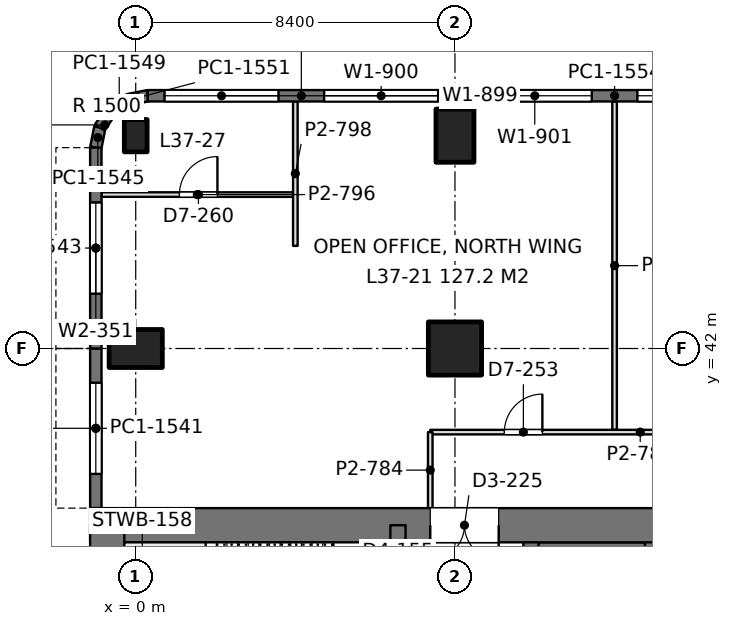
"""IFC4 building model, lengths in metres.
Left out: names, types, materials, properties, quantities, classifications, styles, units other than length and angle.
Written with IfcOpenShell. Run it as: python <this file> out.ifc"""

import sys

from ifc_helpers import new_model, si_unit, direction, frame, frame_2d, origin, origin_2d, place, context, subcontext, project, spatial, rectangle, extrude, element, fill, save


model = new_model("IFC4")
c1 = context("Model", 3, precision=1e-05, world=origin(), true_north=direction((0.0, 1.0)))
c2 = subcontext(c1, "Body", "Model", "MODEL_VIEW")
j1 = project(units=[si_unit("LENGTHUNIT", "METRE"), si_unit("PLANEANGLEUNIT", "RADIAN")], contexts=[c1])
p1 = place(None, origin())
s1 = spatial("IfcSite", under=j1, at=p1, CompositionType="ELEMENT")
p2 = place(p1, origin())
s2 = spatial("IfcBuilding", under=s1, at=p2, CompositionType="ELEMENT")
p3 = place(p2, frame((0.0, 0.0, 163.8)))
s3 = spatial("IfcBuildingStorey", under=s2, at=p3, CompositionType="ELEMENT", Elevation=163.8)
p4 = place(p3, frame((0.0, 42.0, 0.0), z_axis=(0.0, 0.0, 1.0), x_axis=(0.0, 1.0, 0.0)))
e1 = element("IfcColumn", 1, at=p4, inside=s3, PredefinedType="COLUMN", context=c2, shape_type="SweptSolid", body=[
    extrude(rectangle(XDim=1.0, YDim=1.4, at=origin_2d()), origin(), (0.0, 0.0, 1.0), 4.2),
])
p5 = place(p3, frame((0.0, 47.6, 0.0), z_axis=(0.0, 0.0, 1.0), x_axis=(1.0, 0.0, 0.0)))
e2 = element("IfcColumn", 2, at=p5, inside=s3, PredefinedType="COLUMN", context=c2, shape_type="SweptSolid", body=[
    extrude(rectangle(XDim=0.6, YDim=0.85, at=origin_2d()), origin(), (0.0, 0.0, 1.0), 4.2),
])
p6 = place(p3, frame((8.4, 42.0, 0.0), z_axis=(0.0, 0.0, 1.0), x_axis=(1.0, 0.0, 0.0)))
e3 = element("IfcColumn", 3, at=p6, inside=s3, PredefinedType="COLUMN", context=c2, shape_type="SweptSolid", body=[
    extrude(rectangle(XDim=1.4, YDim=1.4, at=origin_2d()), origin(), (0.0, 0.0, 1.0), 4.2),
])
p7 = place(p3, frame((8.4, 47.6, 0.0), z_axis=(0.0, 0.0, 1.0), x_axis=(1.0, 0.0, 0.0)))
e4 = element("IfcColumn", 4, at=p7, inside=s3, PredefinedType="COLUMN", context=c2, shape_type="SweptSolid", body=[
    extrude(rectangle(XDim=1.0, YDim=1.4, at=origin_2d()), origin(), (0.0, 0.0, 1.0), 4.2),
])
p8 = place(p3, frame((-1.2, 37.35, 0.0), z_axis=(0.0, 0.0, 1.0), x_axis=(1.0, 0.0, 0.0)))
e5 = element("IfcWall", 5, at=p8, inside=s3, PredefinedType="SHEAR", context=c2, shape_type="SweptSolid", body=[
    extrude(rectangle(XDim=18.0, YDim=0.9, at=frame_2d((9.0, 0.0))), origin(), (0.0, 0.0, 1.0), 4.2),
])
p9 = place(p8, frame((8.95, 0.0, 0.0)))
e6 = element("IfcOpeningElement", 6, at=p9, cuts=e5, PredefinedType="OPENING", context=c2, shape_type="SweptSolid", body=[
    extrude(rectangle(XDim=1.8, YDim=2.4, at=frame_2d((0.9, 1.2))), frame((0.0, 0.46, 0.0), z_axis=(0.0, -1.0, 0.0), x_axis=(1.0, 0.0, 0.0)), (0.0, 0.0, 1.0), 0.92),
])
p10 = place(p3, frame((-0.75, 13.05, 0.0), z_axis=(0.0, 0.0, 1.0), x_axis=(0.0, 1.0, 0.0)))
e7 = element("IfcWall", 7, at=p10, inside=s3, PredefinedType="SHEAR", context=c2, shape_type="SweptSolid", body=[
    extrude(rectangle(XDim=24.3, YDim=0.9, at=frame_2d((12.15, 0.0))), origin(), (0.0, 0.0, 1.0), 4.2),
])
p11 = place(p3, frame((6.9, 13.05, 0.0), z_axis=(0.0, 0.0, 1.0), x_axis=(0.0, 1.0, 0.0)))
e8 = element("IfcWall", 8, at=p11, inside=s3, PredefinedType="SHEAR", context=c2, shape_type="SweptSolid", body=[
    extrude(rectangle(XDim=24.3, YDim=0.4, at=frame_2d((12.15, 0.0))), origin(), (0.0, 0.0, 1.0), 4.2),
])
p12 = place(p11, frame((1.3, 0.0, 0.0)))
e9 = element("IfcOpeningElement", 9, at=p12, cuts=e8, PredefinedType="OPENING", context=c2, shape_type="SweptSolid", body=[
    extrude(rectangle(XDim=1.0, YDim=2.2, at=frame_2d((0.5, 1.1))), frame((0.0, 0.21, 0.0), z_axis=(0.0, -1.0, 0.0), x_axis=(1.0, 0.0, 0.0)), (0.0, 0.0, 1.0), 0.42),
])
p13 = place(p11, frame((22.0, 0.0, 0.0)))
e10 = element("IfcOpeningElement", 10, at=p13, cuts=e8, PredefinedType="OPENING", context=c2, shape_type="SweptSolid", body=[
    extrude(rectangle(XDim=1.0, YDim=2.2, at=frame_2d((0.5, 1.1))), frame((0.0, 0.21, 0.0), z_axis=(0.0, -1.0, 0.0), x_axis=(1.0, 0.0, 0.0)), (0.0, 0.0, 1.0), 0.42),
])
p14 = place(p11, frame((5.55, 0.0, 0.0)))
e11 = element("IfcOpeningElement", 11, at=p14, cuts=e8, PredefinedType="OPENING", context=c2, shape_type="SweptSolid", body=[
    extrude(rectangle(XDim=1.0, YDim=2.2, at=frame_2d((0.5, 1.1))), frame((0.0, 0.21, 0.0), z_axis=(0.0, -1.0, 0.0), x_axis=(1.0, 0.0, 0.0)), (0.0, 0.0, 1.0), 0.42),
])
p15 = place(p11, frame((9.55, 0.0, 0.0)))
e12 = element("IfcOpeningElement", 12, at=p15, cuts=e8, PredefinedType="OPENING", context=c2, shape_type="SweptSolid", body=[
    extrude(rectangle(XDim=1.0, YDim=2.2, at=frame_2d((0.5, 1.1))), frame((0.0, 0.21, 0.0), z_axis=(0.0, -1.0, 0.0), x_axis=(1.0, 0.0, 0.0)), (0.0, 0.0, 1.0), 0.42),
])
p16 = place(p11, frame((12.8, 0.0, 0.0)))
e13 = element("IfcOpeningElement", 13, at=p16, cuts=e8, PredefinedType="OPENING", context=c2, shape_type="SweptSolid", body=[
    extrude(rectangle(XDim=1.1, YDim=2.2, at=frame_2d((0.55, 1.1))), frame((0.0, 0.21, 0.0), z_axis=(0.0, -1.0, 0.0), x_axis=(1.0, 0.0, 0.0)), (0.0, 0.0, 1.0), 0.42),
])
p17 = place(p11, frame((15.538, 0.0, 0.0)))
e14 = element("IfcOpeningElement", 14, at=p17, cuts=e8, PredefinedType="OPENING", context=c2, shape_type="SweptSolid", body=[
    extrude(rectangle(XDim=1.1, YDim=2.2, at=frame_2d((0.55, 1.1))), frame((0.0, 0.21, 0.0), z_axis=(0.0, -1.0, 0.0), x_axis=(1.0, 0.0, 0.0)), (0.0, 0.0, 1.0), 0.42),
])
p18 = place(p11, frame((18.262, 0.0, 0.0)))
e15 = element("IfcOpeningElement", 15, at=p18, cuts=e8, PredefinedType="OPENING", context=c2, shape_type="SweptSolid", body=[
    extrude(rectangle(XDim=1.1, YDim=2.2, at=frame_2d((0.55, 1.1))), frame((0.0, 0.21, 0.0), z_axis=(0.0, -1.0, 0.0), x_axis=(1.0, 0.0, 0.0)), (0.0, 0.0, 1.0), 0.42),
])
p19 = place(p3, frame((10.4, 13.05, 0.0), z_axis=(0.0, 0.0, 1.0), x_axis=(0.0, 1.0, 0.0)))
e16 = element("IfcWall", 16, at=p19, inside=s3, PredefinedType="SHEAR", context=c2, shape_type="SweptSolid", body=[
    extrude(rectangle(XDim=24.3, YDim=0.4, at=frame_2d((12.15, 0.0))), origin(), (0.0, 0.0, 1.0), 4.2),
])
p20 = place(p19, frame((10.05, 0.0, 0.0)))
e17 = element("IfcOpeningElement", 17, at=p20, cuts=e16, PredefinedType="OPENING", context=c2, shape_type="SweptSolid", body=[
    extrude(rectangle(XDim=1.1, YDim=2.2, at=frame_2d((0.55, 1.1))), frame((0.0, 0.21, 0.0), z_axis=(0.0, -1.0, 0.0), x_axis=(1.0, 0.0, 0.0)), (0.0, 0.0, 1.0), 0.42),
])
p21 = place(p19, frame((12.9, 0.0, 0.0)))
e18 = element("IfcOpeningElement", 18, at=p21, cuts=e16, PredefinedType="OPENING", context=c2, shape_type="SweptSolid", body=[
    extrude(rectangle(XDim=1.1, YDim=2.2, at=frame_2d((0.55, 1.1))), frame((0.0, 0.21, 0.0), z_axis=(0.0, -1.0, 0.0), x_axis=(1.0, 0.0, 0.0)), (0.0, 0.0, 1.0), 0.42),
])
p22 = place(p19, frame((21.45, 0.0, 0.0)))
e19 = element("IfcOpeningElement", 19, at=p22, cuts=e16, PredefinedType="OPENING", context=c2, shape_type="SweptSolid", body=[
    extrude(rectangle(XDim=1.1, YDim=2.2, at=frame_2d((0.55, 1.1))), frame((0.0, 0.21, 0.0), z_axis=(0.0, -1.0, 0.0), x_axis=(1.0, 0.0, 0.0)), (0.0, 0.0, 1.0), 0.42),
])
p23 = place(p19, frame((2.05, 0.0, 0.0)))
e20 = element("IfcOpeningElement", 20, at=p23, cuts=e16, PredefinedType="OPENING", context=c2, shape_type="SweptSolid", body=[
    extrude(rectangle(XDim=1.8, YDim=2.4, at=frame_2d((0.9, 1.2))), frame((0.0, 0.21, 0.0), z_axis=(0.0, -1.0, 0.0), x_axis=(1.0, 0.0, 0.0)), (0.0, 0.0, 1.0), 0.42),
])
p24 = place(p19, frame((5.8, 0.0, 0.0)))
e21 = element("IfcOpeningElement", 21, at=p24, cuts=e16, PredefinedType="OPENING", context=c2, shape_type="SweptSolid", body=[
    extrude(rectangle(XDim=1.8, YDim=2.4, at=frame_2d((0.9, 1.2))), frame((0.0, 0.21, 0.0), z_axis=(0.0, -1.0, 0.0), x_axis=(1.0, 0.0, 0.0)), (0.0, 0.0, 1.0), 0.42),
])
p25 = place(p3, frame((13.6, 22.225, 0.0), z_axis=(0.0, 0.0, 1.0), x_axis=(0.0, 1.0, 0.0)))
e22 = element("IfcWall", 22, at=p25, inside=s3, PredefinedType="SHEAR", context=c2, shape_type="SweptSolid", body=[
    extrude(rectangle(XDim=15.125, YDim=0.4, at=frame_2d((7.562, 0.0))), origin(), (0.0, 0.0, 1.0), 4.2),
])
p26 = place(p3, frame((10.4, 36.625, 0.0), z_axis=(0.0, 0.0, 1.0), x_axis=(1.0, 0.0, 0.0)))
e23 = element("IfcWall", 23, at=p26, inside=s3, PredefinedType="SHEAR", context=c2, shape_type="SweptSolid", body=[
    extrude(rectangle(XDim=3.2, YDim=0.55, at=frame_2d((1.6, 0.0))), origin(), (0.0, 0.0, 1.0), 4.2),
])
p27 = place(p3, frame((-1.05, 37.8, 0.0), z_axis=(0.0, 0.0, 1.0), x_axis=(0.0, 1.0, 0.0)))
e24 = element("IfcWall", 24, at=p27, inside=s3, PredefinedType="SOLIDWALL", context=c2, shape_type="SweptSolid", body=[
    extrude(rectangle(XDim=4.2, YDim=0.3, at=frame_2d((2.1, 0.0))), origin(), (0.0, 0.0, 1.0), 4.0),
])
p28 = place(p27, frame((0.9, 0.0, 0.9)))
e25 = element("IfcOpeningElement", 25, at=p28, cuts=e24, PredefinedType="OPENING", context=c2, shape_type="SweptSolid", body=[
    extrude(rectangle(XDim=2.4, YDim=1.9, at=frame_2d((1.2, 0.95))), frame((0.0, 0.16, 0.0), z_axis=(0.0, -1.0, 0.0), x_axis=(1.0, 0.0, 0.0)), (0.0, 0.0, 1.0), 0.32),
])
p29 = place(p3, frame((-1.05, 42.0, 0.0), z_axis=(0.0, 0.0, 1.0), x_axis=(0.0, 1.0, 0.0)))
e26 = element("IfcWall", 26, at=p29, inside=s3, PredefinedType="SOLIDWALL", context=c2, shape_type="SweptSolid", body=[
    extrude(rectangle(XDim=5.285, YDim=0.3, at=frame_2d((2.643, 0.0))), origin(), (0.0, 0.0, 1.0), 4.0),
])
p30 = place(p29, frame((1.443, 0.0, 0.9)))
e27 = element("IfcOpeningElement", 27, at=p30, cuts=e26, PredefinedType="OPENING", context=c2, shape_type="SweptSolid", body=[
    extrude(rectangle(XDim=2.4, YDim=1.9, at=frame_2d((1.2, 0.95))), frame((0.0, 0.16, 0.0), z_axis=(0.0, -1.0, 0.0), x_axis=(1.0, 0.0, 0.0)), (0.0, 0.0, 1.0), 0.32),
])
p31 = place(p3, frame((-1.05, 47.285, 0.0), z_axis=(0.0, 0.0, 1.0), x_axis=(0.195073962632, 0.980788534345, 0.0)))
e28 = element("IfcWall", 28, at=p31, inside=s3, PredefinedType="SOLIDWALL", context=c2, shape_type="SweptSolid", body=[
    extrude(rectangle(XDim=0.541, YDim=0.3, at=frame_2d((0.271, 0.0))), origin(), (0.0, 0.0, 1.0), 4.0),
])
p32 = place(p3, frame((-0.945, 47.815, 0.0), z_axis=(0.0, 0.0, 1.0), x_axis=(0.55534295404, 0.831621430339, 0.0)))
e29 = element("IfcWall", 29, at=p32, inside=s3, PredefinedType="SOLIDWALL", context=c2, shape_type="SweptSolid", body=[
    extrude(rectangle(XDim=0.526, YDim=0.3, at=frame_2d((0.263, 0.0))), origin(), (0.0, 0.0, 1.0), 4.0),
])
p33 = place(p3, frame((-0.653, 48.253, 0.0), z_axis=(0.0, 0.0, 1.0), x_axis=(0.831692711774, 0.555236195849, 0.0)))
e30 = element("IfcWall", 30, at=p33, inside=s3, PredefinedType="SOLIDWALL", context=c2, shape_type="SweptSolid", body=[
    extrude(rectangle(XDim=0.525, YDim=0.3, at=frame_2d((0.263, 0.0))), origin(), (0.0, 0.0, 1.0), 4.0),
])
p34 = place(p3, frame((-0.216, 48.544, 0.0), z_axis=(0.0, 0.0, 1.0), x_axis=(0.980788534345, 0.195073962632, 0.0)))
e31 = element("IfcWall", 31, at=p34, inside=s3, PredefinedType="SOLIDWALL", context=c2, shape_type="SweptSolid", body=[
    extrude(rectangle(XDim=0.541, YDim=0.3, at=frame_2d((0.271, 0.0))), origin(), (0.0, 0.0, 1.0), 4.0),
])
p35 = place(p3, frame((0.315, 48.65, 0.0), z_axis=(0.0, 0.0, 1.0), x_axis=(1.0, 0.0, 0.0)))
e32 = element("IfcWall", 32, at=p35, inside=s3, PredefinedType="SOLIDWALL", context=c2, shape_type="SweptSolid", body=[
    extrude(rectangle(XDim=8.085, YDim=0.3, at=frame_2d((4.042, 0.0))), origin(), (0.0, 0.0, 1.0), 4.0),
])
p36 = place(p35, frame((0.443, 0.0, 0.9)))
e33 = element("IfcOpeningElement", 33, at=p36, cuts=e32, PredefinedType="OPENING", context=c2, shape_type="SweptSolid", body=[
    extrude(rectangle(XDim=3.0, YDim=1.9, at=frame_2d((1.5, 0.95))), frame((0.0, 0.16, 0.0), z_axis=(0.0, -1.0, 0.0), x_axis=(1.0, 0.0, 0.0)), (0.0, 0.0, 1.0), 0.32),
])
p37 = place(p35, frame((4.643, 0.0, 0.9)))
e34 = element("IfcOpeningElement", 34, at=p37, cuts=e32, PredefinedType="OPENING", context=c2, shape_type="SweptSolid", body=[
    extrude(rectangle(XDim=3.0, YDim=1.9, at=frame_2d((1.5, 0.95))), frame((0.0, 0.16, 0.0), z_axis=(0.0, -1.0, 0.0), x_axis=(1.0, 0.0, 0.0)), (0.0, 0.0, 1.0), 0.32),
])
p38 = place(p3, frame((8.4, 48.65, 0.0), z_axis=(0.0, 0.0, 1.0), x_axis=(1.0, 0.0, 0.0)))
e35 = element("IfcWall", 35, at=p38, inside=s3, PredefinedType="SOLIDWALL", context=c2, shape_type="SweptSolid", body=[
    extrude(rectangle(XDim=8.4, YDim=0.3, at=frame_2d((4.2, 0.0))), origin(), (0.0, 0.0, 1.0), 4.0),
])
p39 = place(p38, frame((0.6, 0.0, 0.9)))
e36 = element("IfcOpeningElement", 36, at=p39, cuts=e35, PredefinedType="OPENING", context=c2, shape_type="SweptSolid", body=[
    extrude(rectangle(XDim=3.0, YDim=1.9, at=frame_2d((1.5, 0.95))), frame((0.0, 0.16, 0.0), z_axis=(0.0, -1.0, 0.0), x_axis=(1.0, 0.0, 0.0)), (0.0, 0.0, 1.0), 0.32),
])
p40 = place(p38, frame((4.8, 0.0, 0.9)))
e37 = element("IfcOpeningElement", 37, at=p40, cuts=e35, PredefinedType="OPENING", context=c2, shape_type="SweptSolid", body=[
    extrude(rectangle(XDim=3.0, YDim=1.9, at=frame_2d((1.5, 0.95))), frame((0.0, 0.16, 0.0), z_axis=(0.0, -1.0, 0.0), x_axis=(1.0, 0.0, 0.0)), (0.0, 0.0, 1.0), 0.32),
])
p41 = place(p3, frame((-0.902, 46.05, 0.0), z_axis=(0.0, 0.0, 1.0), x_axis=(1.0, 0.0, 0.0)))
e38 = element("IfcWall", 38, at=p41, inside=s3, PredefinedType="PARTITIONING", context=c2, shape_type="SweptSolid", body=[
    extrude(rectangle(XDim=5.044, YDim=0.12, at=frame_2d((2.522, 0.0))), origin(), (0.0, 0.0, 1.0), 3.4),
])
p42 = place(p41, frame((2.052, 0.0, 0.0)))
e39 = element("IfcOpeningElement", 39, at=p42, cuts=e38, PredefinedType="OPENING", context=c2, shape_type="SweptSolid", body=[
    extrude(rectangle(XDim=1.0, YDim=2.4, at=frame_2d((0.5, 1.2))), frame((0.0, 0.07, 0.0), z_axis=(0.0, -1.0, 0.0), x_axis=(1.0, 0.0, 0.0)), (0.0, 0.0, 1.0), 0.14),
])
p43 = place(p3, frame((4.2, 44.7, 0.0), z_axis=(0.0, 0.0, 1.0), x_axis=(0.0, 1.0, 0.0)))
e40 = element("IfcWall", 40, at=p43, inside=s3, PredefinedType="PARTITIONING", context=c2, shape_type="SweptSolid", body=[
    extrude(rectangle(XDim=3.802, YDim=0.12, at=frame_2d((1.901, 0.0))), origin(), (0.0, 0.0, 1.0), 3.593),
])
p44 = place(p3, frame((12.6, 39.858, 0.0), z_axis=(0.0, 0.0, 1.0), x_axis=(0.0, 1.0, 0.0)))
e41 = element("IfcWall", 41, at=p44, inside=s3, PredefinedType="PARTITIONING", context=c2, shape_type="SweptSolid", body=[
    extrude(rectangle(XDim=8.644, YDim=0.12, at=frame_2d((4.322, 0.0))), origin(), (0.0, 0.0, 1.0), 3.3),
])
p45 = place(p3, frame((7.75, 39.8, 0.0), z_axis=(0.0, 0.0, 1.0), x_axis=(1.0, 0.0, 0.0)))
e42 = element("IfcWall", 42, at=p45, inside=s3, PredefinedType="PARTITIONING", context=c2, shape_type="SweptSolid", body=[
    extrude(rectangle(XDim=11.05, YDim=0.12, at=frame_2d((5.525, 0.0))), origin(), (0.0, 0.0, 1.0), 3.4),
])
p46 = place(p45, frame((1.95, 0.0, 0.0)))
e43 = element("IfcOpeningElement", 43, at=p46, cuts=e42, PredefinedType="OPENING", context=c2, shape_type="SweptSolid", body=[
    extrude(rectangle(XDim=1.0, YDim=2.4, at=frame_2d((0.5, 1.2))), frame((0.0, 0.07, 0.0), z_axis=(0.0, -1.0, 0.0), x_axis=(1.0, 0.0, 0.0)), (0.0, 0.0, 1.0), 0.14),
])
p47 = place(p45, frame((6.95, 0.0, 0.0)))
e44 = element("IfcOpeningElement", 44, at=p47, cuts=e42, PredefinedType="OPENING", context=c2, shape_type="SweptSolid", body=[
    extrude(rectangle(XDim=1.8, YDim=2.2, at=frame_2d((0.9, 1.1))), frame((0.0, 0.07, 0.0), z_axis=(0.0, -1.0, 0.0), x_axis=(1.0, 0.0, 0.0)), (0.0, 0.0, 1.0), 0.14),
])
p48 = place(p3, frame((7.75, 37.8, 0.0), z_axis=(0.0, 0.0, 1.0), x_axis=(0.0, 1.0, 0.0)))
e45 = element("IfcWall", 45, at=p48, inside=s3, PredefinedType="PARTITIONING", context=c2, shape_type="SweptSolid", body=[
    extrude(rectangle(XDim=2.0, YDim=0.12, at=frame_2d((1.0, 0.0))), origin(), (0.0, 0.0, 1.0), 4.0),
])
p49 = place(p28, origin())
e46 = element("IfcWindow", 46, at=p49, inside=s3, PartitioningType="SINGLE_PANEL", PredefinedType="WINDOW", context=c2, shape_type="SweptSolid", body=[
    extrude(rectangle(XDim=2.4, YDim=1.9, at=frame_2d((1.2, 0.95))), frame((0.0, 0.03, 0.0), z_axis=(0.0, -1.0, 0.0), x_axis=(1.0, 0.0, 0.0)), (0.0, 0.0, 1.0), 0.06),
])
fill(e25, e46)
p50 = place(p30, origin())
e47 = element("IfcWindow", 47, at=p50, inside=s3, PartitioningType="SINGLE_PANEL", PredefinedType="WINDOW", context=c2, shape_type="SweptSolid", body=[
    extrude(rectangle(XDim=2.4, YDim=1.9, at=frame_2d((1.2, 0.95))), frame((0.0, 0.03, 0.0), z_axis=(0.0, -1.0, 0.0), x_axis=(1.0, 0.0, 0.0)), (0.0, 0.0, 1.0), 0.06),
])
fill(e27, e47)
p51 = place(p36, origin())
e48 = element("IfcWindow", 48, at=p51, inside=s3, PartitioningType="SINGLE_PANEL", PredefinedType="WINDOW", context=c2, shape_type="SweptSolid", body=[
    extrude(rectangle(XDim=3.0, YDim=1.9, at=frame_2d((1.5, 0.95))), frame((0.0, 0.03, 0.0), z_axis=(0.0, -1.0, 0.0), x_axis=(1.0, 0.0, 0.0)), (0.0, 0.0, 1.0), 0.06),
])
fill(e33, e48)
p52 = place(p37, origin())
e49 = element("IfcWindow", 49, at=p52, inside=s3, PartitioningType="SINGLE_PANEL", PredefinedType="WINDOW", context=c2, shape_type="SweptSolid", body=[
    extrude(rectangle(XDim=3.0, YDim=1.9, at=frame_2d((1.5, 0.95))), frame((0.0, 0.03, 0.0), z_axis=(0.0, -1.0, 0.0), x_axis=(1.0, 0.0, 0.0)), (0.0, 0.0, 1.0), 0.06),
])
fill(e34, e49)
p53 = place(p39, origin())
e50 = element("IfcWindow", 50, at=p53, inside=s3, PartitioningType="SINGLE_PANEL", PredefinedType="WINDOW", context=c2, shape_type="SweptSolid", body=[
    extrude(rectangle(XDim=3.0, YDim=1.9, at=frame_2d((1.5, 0.95))), frame((0.0, 0.03, 0.0), z_axis=(0.0, -1.0, 0.0), x_axis=(1.0, 0.0, 0.0)), (0.0, 0.0, 1.0), 0.06),
])
fill(e36, e50)
p54 = place(p40, origin())
e51 = element("IfcWindow", 51, at=p54, inside=s3, PartitioningType="SINGLE_PANEL", PredefinedType="WINDOW", context=c2, shape_type="SweptSolid", body=[
    extrude(rectangle(XDim=3.0, YDim=1.9, at=frame_2d((1.5, 0.95))), frame((0.0, 0.03, 0.0), z_axis=(0.0, -1.0, 0.0), x_axis=(1.0, 0.0, 0.0)), (0.0, 0.0, 1.0), 0.06),
])
fill(e37, e51)
p55 = place(p9, frame((1.8, 0.0, 0.0), z_axis=(0.0, 0.0, 1.0), x_axis=(-1.0, 0.0, 0.0)))
e52 = element("IfcDoor", 52, at=p55, inside=s3, OperationType="DOUBLE_DOOR_SINGLE_SWING", PredefinedType="DOOR", context=c2, shape_type="SweptSolid", body=[
    extrude(rectangle(XDim=1.8, YDim=2.4, at=frame_2d((0.9, 1.2))), frame((0.0, 0.025, 0.0), z_axis=(0.0, -1.0, 0.0), x_axis=(1.0, 0.0, 0.0)), (0.0, 0.0, 1.0), 0.05),
])
fill(e6, e52)
p56 = place(p42, origin())
e53 = element("IfcDoor", 53, at=p56, inside=s3, OperationType="SINGLE_SWING_RIGHT", PredefinedType="DOOR", context=c2, shape_type="SweptSolid", body=[
    extrude(rectangle(XDim=1.0, YDim=2.4, at=frame_2d((0.5, 1.2))), frame((0.0, 0.025, 0.0), z_axis=(0.0, -1.0, 0.0), x_axis=(1.0, 0.0, 0.0)), (0.0, 0.0, 1.0), 0.05),
])
fill(e39, e53)
p57 = place(p46, origin())
e54 = element("IfcDoor", 54, at=p57, inside=s3, OperationType="SINGLE_SWING_RIGHT", PredefinedType="DOOR", context=c2, shape_type="SweptSolid", body=[
    extrude(rectangle(XDim=1.0, YDim=2.4, at=frame_2d((0.5, 1.2))), frame((0.0, 0.025, 0.0), z_axis=(0.0, -1.0, 0.0), x_axis=(1.0, 0.0, 0.0)), (0.0, 0.0, 1.0), 0.05),
])
fill(e43, e54)
save(model, sys.argv[1])
